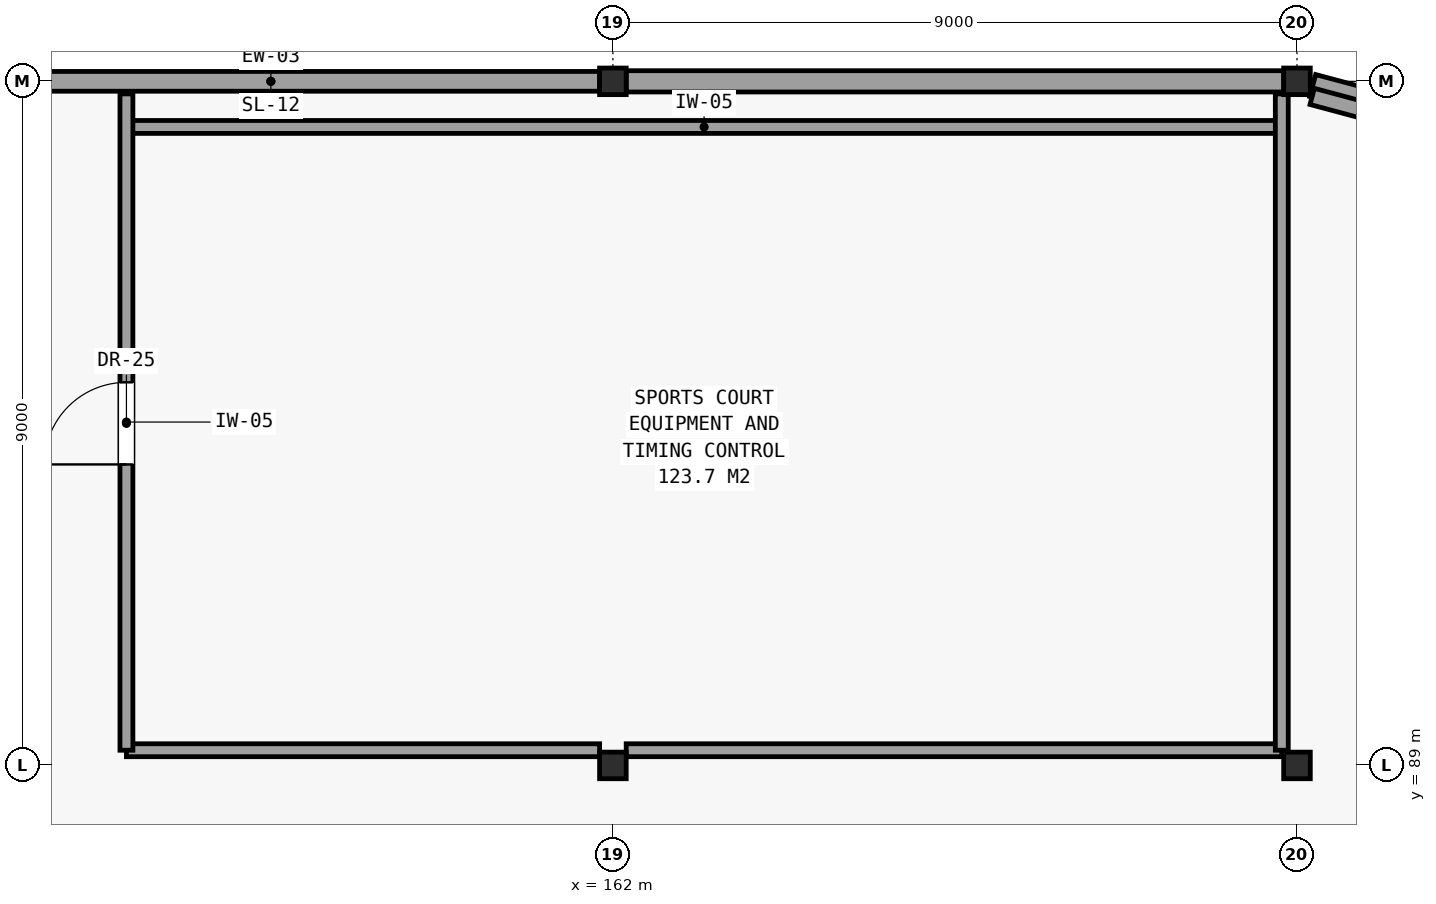
"""IFC4 building model, lengths in metres.
Left out: names, types, materials, properties, quantities, classifications, styles, units other than length and angle.
Written with IfcOpenShell. Run it as: python <this file> out.ifc"""

import sys

from ifc_helpers import new_model, si_unit, direction, frame, frame_2d, origin, origin_2d, place, context, subcontext, project, spatial, rectangle, hollow_rectangle, extrude, element, fill, save


model = new_model("IFC4")
c1 = context("Model", 3, precision=1e-05, world=origin(), true_north=direction((0.0, 1.0)))
c2 = subcontext(c1, "Body", "Model", "MODEL_VIEW")
j1 = project(units=[si_unit("LENGTHUNIT", "METRE"), si_unit("PLANEANGLEUNIT", "RADIAN")], contexts=[c1])
p1 = place(None, origin())
s1 = spatial("IfcSite", under=j1, at=p1, CompositionType="ELEMENT")
p2 = place(p1, origin())
s2 = spatial("IfcBuilding", under=s1, at=p2, CompositionType="ELEMENT")
p3 = place(p2, frame((0.0, 0.0, 26.1)))
s3 = spatial("IfcBuildingStorey", under=s2, at=p3, CompositionType="ELEMENT", Elevation=26.1)
for number, where, z_axis, x_axis in (
    (1, (162.0, 89.0, 0.0), (0.0, 0.0, 1.0), (1.0, 0.0, 0.0)),
    (2, (162.0, 98.0, 0.0), (0.0, 0.0, 1.0), (1.0, 0.0, 0.0)),
    (3, (171.0, 89.0, 0.0), (0.0, 0.0, 1.0), (1.0, 0.0, 0.0)),
    (4, (171.0, 98.0, 0.0), (0.0, 0.0, 1.0), (1.0, 0.0, 0.0)),
):
    element("IfcColumn", number, at=place(p3, frame(where, z_axis=z_axis, x_axis=x_axis)), inside=s3, PredefinedType="COLUMN", context=c2, shape_type="SweptSolid", body=[
        extrude(hollow_rectangle(XDim=0.35, YDim=0.35, WallThickness=0.016, at=origin_2d()), origin(), (0.0, 0.0, 1.0), 4.14),
    ])
p4 = place(p3, frame((175.29, 96.851, 0.0), z_axis=(0.0, 0.0, 1.0), x_axis=(-0.965924589415, 0.258823661135, 0.0)))
e5 = element("IfcWall", 5, at=p4, inside=s3, PredefinedType="SOLIDWALL", context=c2, shape_type="SweptSolid", body=[
    extrude(rectangle(XDim=4.227, YDim=0.3, at=frame_2d((2.113, 0.0))), origin(), (0.0, 0.0, 1.0), 3.34),
])
p5 = place(p3, frame((170.825, 98.0, 0.0), z_axis=(0.0, 0.0, 1.0), x_axis=(-1.0, 0.0, 0.0)))
e6 = element("IfcWall", 6, at=p5, inside=s3, PredefinedType="SOLIDWALL", context=c2, shape_type="SweptSolid", body=[
    extrude(rectangle(XDim=8.65, YDim=0.28, at=frame_2d((4.325, 0.0))), origin(), (0.0, 0.0, 1.0), 3.34),
])
p6 = place(p3, frame((161.825, 98.0, 0.0), z_axis=(0.0, 0.0, 1.0), x_axis=(-1.0, 0.0, 0.0)))
e7 = element("IfcWall", 7, at=p6, inside=s3, PredefinedType="SOLIDWALL", context=c2, shape_type="SweptSolid", body=[
    extrude(rectangle(XDim=8.65, YDim=0.26, at=frame_2d((4.325, 0.0))), origin(), (0.0, 0.0, 1.0), 3.34),
])
p7 = place(p3, frame((171.2, 97.802, 4.295), z_axis=(0.0, 0.0, 1.0), x_axis=(0.96592315171, -0.258829026561, 0.0)))
e8 = element("IfcWall", 8, at=p7, inside=s3, PredefinedType="PARAPET", context=c2, shape_type="SweptSolid", body=[
    extrude(rectangle(XDim=4.377, YDim=0.22, at=frame_2d((2.188, 0.0))), origin(), (0.0, 0.0, 1.0), 0.425),
])
p8 = place(p3, frame((155.6, 89.2, 0.0), z_axis=(0.0, 0.0, 1.0), x_axis=(1.0, 0.0, 0.0)))
e9 = element("IfcWall", 9, at=p8, inside=s3, PredefinedType="PARTITIONING", context=c2, shape_type="SweptSolid", body=[
    extrude(rectangle(XDim=6.225, YDim=0.17, at=frame_2d((3.112, 0.0))), origin(), (0.0, 0.0, 1.0), 3.581),
])
p9 = place(p3, frame((162.175, 89.2, 0.0), z_axis=(0.0, 0.0, 1.0), x_axis=(1.0, 0.0, 0.0)))
e10 = element("IfcWall", 10, at=p9, inside=s3, PredefinedType="PARTITIONING", context=c2, shape_type="SweptSolid", body=[
    extrude(rectangle(XDim=8.625, YDim=0.17, at=frame_2d((4.312, 0.0))), origin(), (0.0, 0.0, 1.0), 3.581),
])
p10 = place(p3, frame((155.6, 97.4, 0.0), z_axis=(0.0, 0.0, 1.0), x_axis=(1.0, 0.0, 0.0)))
e11 = element("IfcWall", 11, at=p10, inside=s3, PredefinedType="PARTITIONING", context=c2, shape_type="SweptSolid", body=[
    extrude(rectangle(XDim=15.2, YDim=0.17, at=frame_2d((7.6, 0.0))), origin(), (0.0, 0.0, 1.0), 3.94),
])
p11 = place(p3, frame((155.6, 89.2, 0.0), z_axis=(0.0, 0.0, 1.0), x_axis=(0.0, 1.0, 0.0)))
e12 = element("IfcWall", 12, at=p11, inside=s3, PredefinedType="PARTITIONING", context=c2, shape_type="SweptSolid", body=[
    extrude(rectangle(XDim=8.635, YDim=0.17, at=frame_2d((4.317, 0.0))), origin(), (0.0, 0.0, 1.0), 3.581),
])
p12 = place(p11, frame((3.76, 0.0, 0.0)))
e13 = element("IfcOpeningElement", 13, at=p12, cuts=e12, PredefinedType="OPENING", context=c2, shape_type="SweptSolid", body=[
    extrude(rectangle(XDim=1.08, YDim=2.15, at=frame_2d((0.54, 1.075))), frame((0.0, 0.096, 0.0), z_axis=(0.0, -1.0, 0.0), x_axis=(1.0, 0.0, 0.0)), (0.0, 0.0, 1.0), 0.192),
])
p13 = place(p3, frame((170.8, 89.2, 0.0), z_axis=(0.0, 0.0, 1.0), x_axis=(0.0, 1.0, 0.0)))
e14 = element("IfcWall", 14, at=p13, inside=s3, PredefinedType="PARTITIONING", context=c2, shape_type="SweptSolid", body=[
    extrude(rectangle(XDim=8.635, YDim=0.17, at=frame_2d((4.317, 0.0))), origin(), (0.0, 0.0, 1.0), 3.581),
])
p14 = place(p12, origin())
e15 = element("IfcDoor", 15, at=p14, inside=s3, OperationType="SINGLE_SWING_LEFT", PredefinedType="DOOR", context=c2, shape_type="SweptSolid", body=[
    extrude(rectangle(XDim=1.08, YDim=2.15, at=frame_2d((0.54, 1.075))), frame((0.0, 0.025, 0.0), z_axis=(0.0, -1.0, 0.0), x_axis=(1.0, 0.0, 0.0)), (0.0, 0.0, 1.0), 0.05),
])
fill(e13, e15)
save(model, sys.argv[1])
